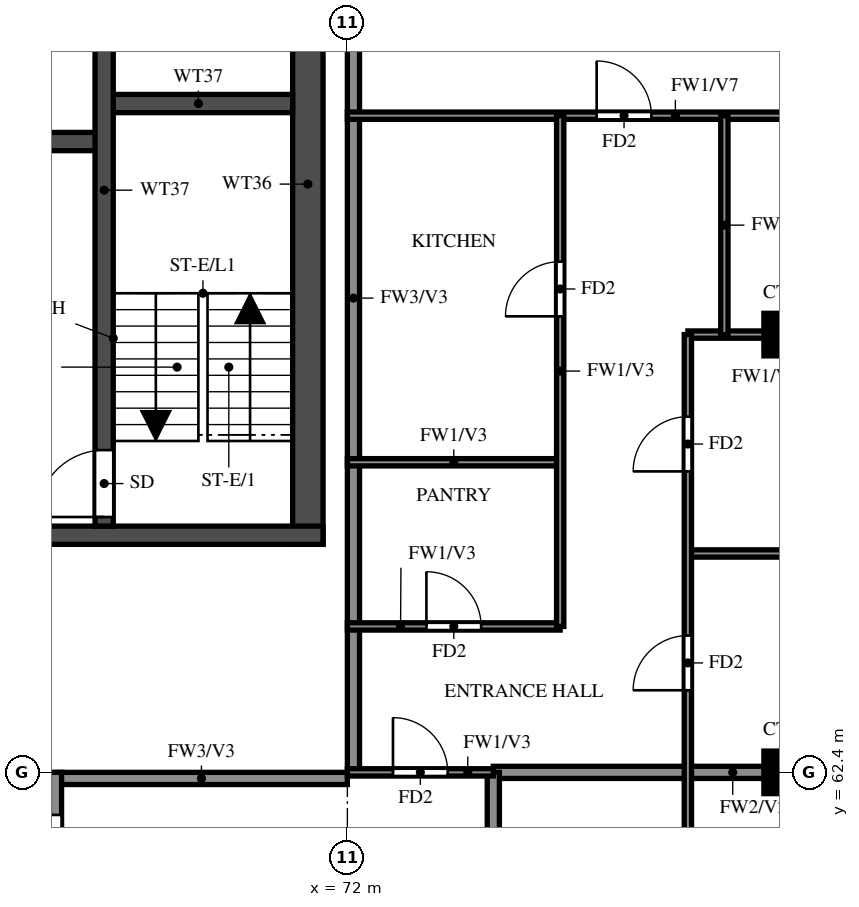
"""IFC4 building model, lengths in metres.
Left out: names, types, materials, properties, quantities, classifications, styles, units other than length and angle.
Written with IfcOpenShell. Run it as: python <this file> out.ifc"""

import sys

from ifc_helpers import new_model, si_unit, direction, frame, frame_2d, origin, origin_2d, place, context, subcontext, project, spatial, rectangle, extrude, source, transform, mapped, element, fill, save


model = new_model("IFC4")
c1 = context("Model", 3, precision=1e-05, world=origin(), true_north=direction((0.0, 1.0)))
c2 = subcontext(c1, "Body", "Model", "MODEL_VIEW")
j1 = project(units=[si_unit("LENGTHUNIT", "METRE"), si_unit("PLANEANGLEUNIT", "RADIAN")], contexts=[c1])
p1 = place(None, origin())
s1 = spatial("IfcSite", under=j1, at=p1, CompositionType="ELEMENT")
p2 = place(p1, origin())
s2 = spatial("IfcBuilding", under=s1, at=p2, CompositionType="ELEMENT")
p3 = place(p2, frame((0.0, 0.0, 260.5)))
s3 = spatial("IfcBuildingStorey", under=s2, at=p3, CompositionType="ELEMENT", Elevation=260.5)
m1 = source(origin(), c2, "Body", "SweptSolid", [
    extrude(rectangle(XDim=0.7, YDim=0.7, at=origin_2d()), origin(), (0.0, 0.0, 1.0), 3.22),
])
for number, where, z_axis, x_axis in (
    (1, (79.2, 62.4, 0.0), (0.0, 0.0, 1.0), (1.0, 0.0, 0.0)),
    (2, (79.2, 69.6, 0.0), (0.0, 0.0, 1.0), (1.0, 0.0, 0.0)),
):
    element("IfcColumn", number, at=place(p3, frame(where, z_axis=z_axis, x_axis=x_axis)), inside=s3, PredefinedType="COLUMN", context=c2, shape_type="MappedRepresentation", body=[
        mapped(m1, transform((0.0, 0.0, 0.0))),
    ])
p4 = place(p3, frame((71.35, 66.15, 0.0), z_axis=(0.0, 0.0, 1.0), x_axis=(0.0, 1.0, 0.0)))
e3 = element("IfcWall", 3, at=p4, inside=s3, PredefinedType="SHEAR", context=c2, shape_type="SweptSolid", body=[
    extrude(rectangle(XDim=11.85, YDim=0.5, at=frame_2d((5.925, 0.0))), origin(), (0.0, 0.0, 1.0), 3.22),
])
p5 = place(p3, frame((29.2, 66.3, 0.0), z_axis=(0.0, 0.0, 1.0), x_axis=(1.0, 0.0, 0.0)))
e4 = element("IfcWall", 4, at=p5, inside=s3, PredefinedType="SHEAR", context=c2, shape_type="SweptSolid", body=[
    extrude(rectangle(XDim=42.4, YDim=0.3, at=frame_2d((21.2, 0.0))), origin(), (0.0, 0.0, 1.0), 3.22),
])
p6 = place(p5, frame((1.425, 0.0, 0.0)))
e5 = element("IfcOpeningElement", 5, at=p6, cuts=e4, PredefinedType="OPENING", context=c2, shape_type="SweptSolid", body=[
    extrude(rectangle(XDim=1.1, YDim=2.1, at=frame_2d((0.55, 1.05))), frame((0.0, 0.16, 0.0), z_axis=(0.0, -1.0, 0.0), x_axis=(1.0, 0.0, 0.0)), (0.0, 0.0, 1.0), 0.32),
])
p7 = place(p5, frame((4.2, 0.0, 0.0)))
e6 = element("IfcOpeningElement", 6, at=p7, cuts=e4, PredefinedType="OPENING", context=c2, shape_type="SweptSolid", body=[
    extrude(rectangle(XDim=1.8, YDim=2.1, at=frame_2d((0.9, 1.05))), frame((0.0, 0.16, 0.0), z_axis=(0.0, -1.0, 0.0), x_axis=(1.0, 0.0, 0.0)), (0.0, 0.0, 1.0), 0.32),
])
p8 = place(p3, frame((32.8, 72.775, 0.0), z_axis=(0.0, 0.0, 1.0), x_axis=(1.0, 0.0, 0.0)))
e7 = element("IfcWall", 7, at=p8, inside=s3, PredefinedType="SHEAR", context=c2, shape_type="SweptSolid", body=[
    extrude(rectangle(XDim=35.2, YDim=0.3, at=frame_2d((17.6, 0.0))), origin(), (0.0, 0.0, 1.0), 3.22),
])
p9 = place(p8, frame((19.8, 0.0, 0.0)))
e8 = element("IfcOpeningElement", 8, at=p9, cuts=e7, PredefinedType="OPENING", context=c2, shape_type="SweptSolid", body=[
    extrude(rectangle(XDim=1.1, YDim=2.1, at=frame_2d((0.55, 1.05))), frame((0.0, 0.16, 0.0), z_axis=(0.0, -1.0, 0.0), x_axis=(1.0, 0.0, 0.0)), (0.0, 0.0, 1.0), 0.32),
])
p10 = place(p8, frame((27.725, 0.0, 0.0)))
e9 = element("IfcOpeningElement", 9, at=p10, cuts=e7, PredefinedType="OPENING", context=c2, shape_type="SweptSolid", body=[
    extrude(rectangle(XDim=1.1, YDim=2.1, at=frame_2d((0.55, 1.05))), frame((0.0, 0.16, 0.0), z_axis=(0.0, -1.0, 0.0), x_axis=(1.0, 0.0, 0.0)), (0.0, 0.0, 1.0), 0.32),
])
p11 = place(p8, frame((30.325, 0.0, 0.0)))
e10 = element("IfcOpeningElement", 10, at=p11, cuts=e7, PredefinedType="OPENING", context=c2, shape_type="SweptSolid", body=[
    extrude(rectangle(XDim=1.1, YDim=2.1, at=frame_2d((0.55, 1.05))), frame((0.0, 0.16, 0.0), z_axis=(0.0, -1.0, 0.0), x_axis=(1.0, 0.0, 0.0)), (0.0, 0.0, 1.0), 0.32),
])
p12 = place(p8, frame((3.825, 0.0, 0.0)))
e11 = element("IfcOpeningElement", 11, at=p12, cuts=e7, PredefinedType="OPENING", context=c2, shape_type="SweptSolid", body=[
    extrude(rectangle(XDim=1.1, YDim=2.1, at=frame_2d((0.55, 1.05))), frame((0.0, 0.16, 0.0), z_axis=(0.0, -1.0, 0.0), x_axis=(1.0, 0.0, 0.0)), (0.0, 0.0, 1.0), 0.32),
])
p13 = place(p8, frame((6.575, 0.0, 0.0)))
e12 = element("IfcOpeningElement", 12, at=p13, cuts=e7, PredefinedType="OPENING", context=c2, shape_type="SweptSolid", body=[
    extrude(rectangle(XDim=1.1, YDim=2.1, at=frame_2d((0.55, 1.05))), frame((0.0, 0.16, 0.0), z_axis=(0.0, -1.0, 0.0), x_axis=(1.0, 0.0, 0.0)), (0.0, 0.0, 1.0), 0.32),
])
p14 = place(p8, frame((9.325, 0.0, 0.0)))
e13 = element("IfcOpeningElement", 13, at=p14, cuts=e7, PredefinedType="OPENING", context=c2, shape_type="SweptSolid", body=[
    extrude(rectangle(XDim=1.1, YDim=2.1, at=frame_2d((0.55, 1.05))), frame((0.0, 0.16, 0.0), z_axis=(0.0, -1.0, 0.0), x_axis=(1.0, 0.0, 0.0)), (0.0, 0.0, 1.0), 0.32),
])
p15 = place(p8, frame((12.075, 0.0, 0.0)))
e14 = element("IfcOpeningElement", 14, at=p15, cuts=e7, PredefinedType="OPENING", context=c2, shape_type="SweptSolid", body=[
    extrude(rectangle(XDim=1.1, YDim=2.1, at=frame_2d((0.55, 1.05))), frame((0.0, 0.16, 0.0), z_axis=(0.0, -1.0, 0.0), x_axis=(1.0, 0.0, 0.0)), (0.0, 0.0, 1.0), 0.32),
])
p16 = place(p8, frame((14.825, 0.0, 0.0)))
e15 = element("IfcOpeningElement", 15, at=p16, cuts=e7, PredefinedType="OPENING", context=c2, shape_type="SweptSolid", body=[
    extrude(rectangle(XDim=1.1, YDim=2.1, at=frame_2d((0.55, 1.05))), frame((0.0, 0.16, 0.0), z_axis=(0.0, -1.0, 0.0), x_axis=(1.0, 0.0, 0.0)), (0.0, 0.0, 1.0), 0.32),
])
p17 = place(p8, frame((17.575, 0.0, 0.0)))
e16 = element("IfcOpeningElement", 16, at=p17, cuts=e7, PredefinedType="OPENING", context=c2, shape_type="SweptSolid", body=[
    extrude(rectangle(XDim=1.1, YDim=2.1, at=frame_2d((0.55, 1.05))), frame((0.0, 0.16, 0.0), z_axis=(0.0, -1.0, 0.0), x_axis=(1.0, 0.0, 0.0)), (0.0, 0.0, 1.0), 0.32),
])
p18 = place(p8, frame((0.95, 0.0, 0.0)))
e17 = element("IfcOpeningElement", 17, at=p18, cuts=e7, PredefinedType="OPENING", context=c2, shape_type="SweptSolid", body=[
    extrude(rectangle(XDim=1.1, YDim=2.1, at=frame_2d((0.55, 1.05))), frame((0.0, 0.16, 0.0), z_axis=(0.0, -1.0, 0.0), x_axis=(1.0, 0.0, 0.0)), (0.0, 0.0, 1.0), 0.32),
])
p19 = place(p3, frame((68.0, 73.4, 0.0), z_axis=(0.0, 0.0, 1.0), x_axis=(1.0, 0.0, 0.0)))
e18 = element("IfcWall", 18, at=p19, inside=s3, PredefinedType="SHEAR", context=c2, shape_type="SweptSolid", body=[
    extrude(rectangle(XDim=3.1, YDim=0.3, at=frame_2d((1.55, 0.0))), origin(), (0.0, 0.0, 1.0), 3.22),
])
p20 = place(p3, frame((68.0, 66.45, 0.0), z_axis=(0.0, 0.0, 1.0), x_axis=(0.0, 1.0, 0.0)))
e19 = element("IfcWall", 19, at=p20, inside=s3, PredefinedType="SHEAR", context=c2, shape_type="SweptSolid", body=[
    extrude(rectangle(XDim=11.05, YDim=0.3, at=frame_2d((5.525, 0.0))), origin(), (0.0, 0.0, 1.0), 3.22),
])
p21 = place(p20, frame((0.15, 0.0, 0.0)))
e20 = element("IfcOpeningElement", 20, at=p21, cuts=e19, PredefinedType="OPENING", context=c2, shape_type="SweptSolid", body=[
    extrude(rectangle(XDim=1.1, YDim=2.1, at=frame_2d((0.55, 1.05))), frame((0.0, 0.16, 0.0), z_axis=(0.0, -1.0, 0.0), x_axis=(1.0, 0.0, 0.0)), (0.0, 0.0, 1.0), 0.32),
])
p22 = place(p3, frame((67.2, 62.3, 0.0), z_axis=(0.0, 0.0, 1.0), x_axis=(1.0, 0.0, 0.0)))
e21 = element("IfcWall", 21, at=p22, inside=s3, PredefinedType="SOLIDWALL", context=c2, shape_type="SweptSolid", body=[
    extrude(rectangle(XDim=4.8, YDim=0.2, at=frame_2d((2.4, 0.0))), origin(), (0.0, 0.0, 1.0), 3.22),
])
p23 = place(p3, frame((67.2, 60.0, 0.0), z_axis=(0.0, 0.0, 1.0), x_axis=(0.0, 1.0, 0.0)))
e22 = element("IfcWall", 22, at=p23, inside=s3, PredefinedType="SOLIDWALL", context=c2, shape_type="SweptSolid", body=[
    extrude(rectangle(XDim=2.4, YDim=0.2, at=frame_2d((1.2, 0.0))), origin(), (0.0, 0.0, 1.0), 3.22),
])
p24 = place(p23, frame((0.7, 0.0, 0.0)))
e23 = element("IfcOpeningElement", 23, at=p24, cuts=e22, PredefinedType="OPENING", context=c2, shape_type="SweptSolid", body=[
    extrude(rectangle(XDim=1.0, YDim=2.1, at=frame_2d((0.5, 1.05))), frame((0.0, 0.11, 0.0), z_axis=(0.0, -1.0, 0.0), x_axis=(1.0, 0.0, 0.0)), (0.0, 0.0, 1.0), 0.22),
])
p25 = place(p3, frame((72.1, 62.4, 0.0), z_axis=(0.0, 0.0, 1.0), x_axis=(0.0, 1.0, 0.0)))
e24 = element("IfcWall", 24, at=p25, inside=s3, PredefinedType="SOLIDWALL", context=c2, shape_type="SweptSolid", body=[
    extrude(rectangle(XDim=15.6, YDim=0.2, at=frame_2d((7.8, 0.0))), origin(), (0.0, 0.0, 1.0), 3.22),
])
p26 = place(p3, frame((74.4, 62.4, 0.0), z_axis=(0.0, 0.0, 1.0), x_axis=(1.0, 0.0, 0.0)))
e25 = element("IfcWall", 25, at=p26, inside=s3, PredefinedType="SOLIDWALL", context=c2, shape_type="SweptSolid", body=[
    extrude(rectangle(XDim=7.875, YDim=0.2, at=frame_2d((3.938, 0.0))), origin(), (0.0, 0.0, 1.0), 3.22),
])
p27 = place(p3, frame((74.4, 60.0, 0.0), z_axis=(0.0, 0.0, 1.0), x_axis=(0.0, 1.0, 0.0)))
e26 = element("IfcWall", 26, at=p27, inside=s3, PredefinedType="SOLIDWALL", context=c2, shape_type="SweptSolid", body=[
    extrude(rectangle(XDim=2.4, YDim=0.2, at=frame_2d((1.2, 0.0))), origin(), (0.0, 0.0, 1.0), 3.22),
])
p28 = place(p3, frame((72.0, 62.4, 0.0), z_axis=(0.0, 0.0, 1.0), x_axis=(1.0, 0.0, 0.0)))
e27 = element("IfcWall", 27, at=p28, inside=s3, PredefinedType="PARTITIONING", context=c2, shape_type="SweptSolid", body=[
    extrude(rectangle(XDim=2.4, YDim=0.12, at=frame_2d((1.2, 0.0))), origin(), (0.0, 0.0, 1.0), 3.22),
])
p29 = place(p28, frame((0.75, 0.0, 0.0)))
e28 = element("IfcOpeningElement", 28, at=p29, cuts=e27, PredefinedType="OPENING", context=c2, shape_type="SweptSolid", body=[
    extrude(rectangle(XDim=0.9, YDim=2.1, at=frame_2d((0.45, 1.05))), frame((0.0, 0.07, 0.0), z_axis=(0.0, -1.0, 0.0), x_axis=(1.0, 0.0, 0.0)), (0.0, 0.0, 1.0), 0.14),
])
p30 = place(p3, frame((72.0, 64.8, 0.0), z_axis=(0.0, 0.0, 1.0), x_axis=(1.0, 0.0, 0.0)))
e29 = element("IfcWall", 29, at=p30, inside=s3, PredefinedType="PARTITIONING", context=c2, shape_type="SweptSolid", body=[
    extrude(rectangle(XDim=3.5, YDim=0.12, at=frame_2d((1.75, 0.0))), origin(), (0.0, 0.0, 1.0), 3.22),
])
p31 = place(p30, frame((1.3, 0.0, 0.0)))
e30 = element("IfcOpeningElement", 30, at=p31, cuts=e29, PredefinedType="OPENING", context=c2, shape_type="SweptSolid", body=[
    extrude(rectangle(XDim=0.9, YDim=2.1, at=frame_2d((0.45, 1.05))), frame((0.0, 0.07, 0.0), z_axis=(0.0, -1.0, 0.0), x_axis=(1.0, 0.0, 0.0)), (0.0, 0.0, 1.0), 0.14),
])
p32 = place(p3, frame((77.6, 66.0, 0.0), z_axis=(0.0, 0.0, 1.0), x_axis=(1.0, 0.0, 0.0)))
e31 = element("IfcWall", 31, at=p32, inside=s3, PredefinedType="PARTITIONING", context=c2, shape_type="SweptSolid", body=[
    extrude(rectangle(XDim=4.675, YDim=0.12, at=frame_2d((2.337, 0.0))), origin(), (0.0, 0.0, 1.0), 2.32),
])
p33 = place(p3, frame((72.0, 67.5, 0.0), z_axis=(0.0, 0.0, 1.0), x_axis=(1.0, 0.0, 0.0)))
e32 = element("IfcWall", 32, at=p33, inside=s3, PredefinedType="PARTITIONING", context=c2, shape_type="SweptSolid", body=[
    extrude(rectangle(XDim=3.5, YDim=0.12, at=frame_2d((1.75, 0.0))), origin(), (0.0, 0.0, 1.0), 3.22),
])
p34 = place(p3, frame((77.6, 69.6, 0.0), z_axis=(0.0, 0.0, 1.0), x_axis=(1.0, 0.0, 0.0)))
e33 = element("IfcWall", 33, at=p34, inside=s3, PredefinedType="PARTITIONING", context=c2, shape_type="SweptSolid", body=[
    extrude(rectangle(XDim=4.675, YDim=0.12, at=frame_2d((2.337, 0.0))), origin(), (0.0, 0.0, 1.0), 3.22),
])
p35 = place(p34, frame((2.337, 0.0, 0.0)))
e34 = element("IfcOpeningElement", 34, at=p35, cuts=e33, PredefinedType="OPENING", context=c2, shape_type="SweptSolid", body=[
    extrude(rectangle(XDim=0.8, YDim=2.1, at=frame_2d((0.4, 1.05))), frame((0.0, 0.07, 0.0), z_axis=(0.0, -1.0, 0.0), x_axis=(1.0, 0.0, 0.0)), (0.0, 0.0, 1.0), 0.14),
])
p36 = place(p3, frame((72.0, 73.2, 0.0), z_axis=(0.0, 0.0, 1.0), x_axis=(1.0, 0.0, 0.0)))
e35 = element("IfcWall", 35, at=p36, inside=s3, PredefinedType="PARTITIONING", context=c2, shape_type="SweptSolid", body=[
    extrude(rectangle(XDim=10.275, YDim=0.12, at=frame_2d((5.137, 0.0))), origin(), (0.0, 0.0, 1.0), 2.32),
])
p37 = place(p36, frame((4.1, 0.0, 0.0)))
e36 = element("IfcOpeningElement", 36, at=p37, cuts=e35, PredefinedType="OPENING", context=c2, shape_type="SweptSolid", body=[
    extrude(rectangle(XDim=0.9, YDim=2.1, at=frame_2d((0.45, 1.05))), frame((0.0, 0.07, 0.0), z_axis=(0.0, -1.0, 0.0), x_axis=(1.0, 0.0, 0.0)), (0.0, 0.0, 1.0), 0.14),
])
p38 = place(p3, frame((75.5, 64.8, 0.0), z_axis=(0.0, 0.0, 1.0), x_axis=(0.0, 1.0, 0.0)))
e37 = element("IfcWall", 37, at=p38, inside=s3, PredefinedType="PARTITIONING", context=c2, shape_type="SweptSolid", body=[
    extrude(rectangle(XDim=8.4, YDim=0.12, at=frame_2d((4.2, 0.0))), origin(), (0.0, 0.0, 1.0), 3.22),
])
p39 = place(p38, frame((5.1, 0.0, 0.0)))
e38 = element("IfcOpeningElement", 38, at=p39, cuts=e37, PredefinedType="OPENING", context=c2, shape_type="SweptSolid", body=[
    extrude(rectangle(XDim=0.9, YDim=2.1, at=frame_2d((0.45, 1.05))), frame((0.0, 0.07, 0.0), z_axis=(0.0, -1.0, 0.0), x_axis=(1.0, 0.0, 0.0)), (0.0, 0.0, 1.0), 0.14),
])
p40 = place(p3, frame((77.6, 48.125, 0.0), z_axis=(0.0, 0.0, 1.0), x_axis=(0.0, 1.0, 0.0)))
e39 = element("IfcWall", 39, at=p40, inside=s3, PredefinedType="PARTITIONING", context=c2, shape_type="SweptSolid", body=[
    extrude(rectangle(XDim=21.475, YDim=0.12, at=frame_2d((10.738, 0.0))), origin(), (0.0, 0.0, 1.0), 3.22),
])
p41 = place(p40, frame((1.288, 0.0, 0.0)))
e40 = element("IfcOpeningElement", 40, at=p41, cuts=e39, PredefinedType="OPENING", context=c2, shape_type="SweptSolid", body=[
    extrude(rectangle(XDim=0.9, YDim=2.1, at=frame_2d((0.45, 1.05))), frame((0.0, 0.07, 0.0), z_axis=(0.0, -1.0, 0.0), x_axis=(1.0, 0.0, 0.0)), (0.0, 0.0, 1.0), 0.14),
])
p42 = place(p40, frame((4.825, 0.0, 0.0)))
e41 = element("IfcOpeningElement", 41, at=p42, cuts=e39, PredefinedType="OPENING", context=c2, shape_type="SweptSolid", body=[
    extrude(rectangle(XDim=0.9, YDim=2.1, at=frame_2d((0.45, 1.05))), frame((0.0, 0.07, 0.0), z_axis=(0.0, -1.0, 0.0), x_axis=(1.0, 0.0, 0.0)), (0.0, 0.0, 1.0), 0.14),
])
p43 = place(p40, frame((9.925, 0.0, 0.0)))
e42 = element("IfcOpeningElement", 42, at=p43, cuts=e39, PredefinedType="OPENING", context=c2, shape_type="SweptSolid", body=[
    extrude(rectangle(XDim=1.5, YDim=2.1, at=frame_2d((0.75, 1.05))), frame((0.0, 0.07, 0.0), z_axis=(0.0, -1.0, 0.0), x_axis=(1.0, 0.0, 0.0)), (0.0, 0.0, 1.0), 0.14),
])
p44 = place(p40, frame((15.625, 0.0, 0.0)))
e43 = element("IfcOpeningElement", 43, at=p44, cuts=e39, PredefinedType="OPENING", context=c2, shape_type="SweptSolid", body=[
    extrude(rectangle(XDim=0.9, YDim=2.1, at=frame_2d((0.45, 1.05))), frame((0.0, 0.07, 0.0), z_axis=(0.0, -1.0, 0.0), x_axis=(1.0, 0.0, 0.0)), (0.0, 0.0, 1.0), 0.14),
])
p45 = place(p40, frame((19.225, 0.0, 0.0)))
e44 = element("IfcOpeningElement", 44, at=p45, cuts=e39, PredefinedType="OPENING", context=c2, shape_type="SweptSolid", body=[
    extrude(rectangle(XDim=0.9, YDim=2.1, at=frame_2d((0.45, 1.05))), frame((0.0, 0.07, 0.0), z_axis=(0.0, -1.0, 0.0), x_axis=(1.0, 0.0, 0.0)), (0.0, 0.0, 1.0), 0.14),
])
p46 = place(p3, frame((78.2, 69.6, 0.0), z_axis=(0.0, 0.0, 1.0), x_axis=(0.0, 1.0, 0.0)))
e45 = element("IfcWall", 45, at=p46, inside=s3, PredefinedType="PARTITIONING", context=c2, shape_type="SweptSolid", body=[
    extrude(rectangle(XDim=3.6, YDim=0.12, at=frame_2d((1.8, 0.0))), origin(), (0.0, 0.0, 1.0), 3.22),
])
p47 = place(p21, origin())
e46 = element("IfcDoor", 46, at=p47, inside=s3, OperationType="SINGLE_SWING_RIGHT", PredefinedType="DOOR", context=c2, shape_type="SweptSolid", body=[
    extrude(rectangle(XDim=1.1, YDim=2.1, at=frame_2d((0.55, 1.05))), frame((0.0, 0.025, 0.0), z_axis=(0.0, -1.0, 0.0), x_axis=(1.0, 0.0, 0.0)), (0.0, 0.0, 1.0), 0.05),
])
fill(e20, e46)
p48 = place(p29, origin())
e47 = element("IfcDoor", 47, at=p48, inside=s3, OperationType="SINGLE_SWING_LEFT", PredefinedType="DOOR", context=c2, shape_type="SweptSolid", body=[
    extrude(rectangle(XDim=0.9, YDim=2.1, at=frame_2d((0.45, 1.05))), frame((0.0, 0.025, 0.0), z_axis=(0.0, -1.0, 0.0), x_axis=(1.0, 0.0, 0.0)), (0.0, 0.0, 1.0), 0.05),
])
fill(e28, e47)
p49 = place(p24, origin())
e48 = element("IfcDoor", 48, at=p49, inside=s3, OperationType="SINGLE_SWING_RIGHT", PredefinedType="DOOR", context=c2, shape_type="SweptSolid", body=[
    extrude(rectangle(XDim=1.0, YDim=2.1, at=frame_2d((0.5, 1.05))), frame((0.0, 0.025, 0.0), z_axis=(0.0, -1.0, 0.0), x_axis=(1.0, 0.0, 0.0)), (0.0, 0.0, 1.0), 0.05),
])
fill(e23, e48)
p50 = place(p44, origin())
e49 = element("IfcDoor", 49, at=p50, inside=s3, OperationType="SINGLE_SWING_LEFT", PredefinedType="DOOR", context=c2, shape_type="SweptSolid", body=[
    extrude(rectangle(XDim=0.9, YDim=2.1, at=frame_2d((0.45, 1.05))), frame((0.0, 0.025, 0.0), z_axis=(0.0, -1.0, 0.0), x_axis=(1.0, 0.0, 0.0)), (0.0, 0.0, 1.0), 0.05),
])
fill(e43, e49)
p51 = place(p45, origin())
e50 = element("IfcDoor", 50, at=p51, inside=s3, OperationType="SINGLE_SWING_LEFT", PredefinedType="DOOR", context=c2, shape_type="SweptSolid", body=[
    extrude(rectangle(XDim=0.9, YDim=2.1, at=frame_2d((0.45, 1.05))), frame((0.0, 0.025, 0.0), z_axis=(0.0, -1.0, 0.0), x_axis=(1.0, 0.0, 0.0)), (0.0, 0.0, 1.0), 0.05),
])
fill(e44, e50)
p52 = place(p37, origin())
e51 = element("IfcDoor", 51, at=p52, inside=s3, OperationType="SINGLE_SWING_LEFT", PredefinedType="DOOR", context=c2, shape_type="SweptSolid", body=[
    extrude(rectangle(XDim=0.9, YDim=2.1, at=frame_2d((0.45, 1.05))), frame((0.0, 0.025, 0.0), z_axis=(0.0, -1.0, 0.0), x_axis=(1.0, 0.0, 0.0)), (0.0, 0.0, 1.0), 0.05),
])
fill(e36, e51)
p53 = place(p31, origin())
e52 = element("IfcDoor", 52, at=p53, inside=s3, OperationType="SINGLE_SWING_LEFT", PredefinedType="DOOR", context=c2, shape_type="SweptSolid", body=[
    extrude(rectangle(XDim=0.9, YDim=2.1, at=frame_2d((0.45, 1.05))), frame((0.0, 0.025, 0.0), z_axis=(0.0, -1.0, 0.0), x_axis=(1.0, 0.0, 0.0)), (0.0, 0.0, 1.0), 0.05),
])
fill(e30, e52)
p54 = place(p39, origin())
e53 = element("IfcDoor", 53, at=p54, inside=s3, OperationType="SINGLE_SWING_RIGHT", PredefinedType="DOOR", context=c2, shape_type="SweptSolid", body=[
    extrude(rectangle(XDim=0.9, YDim=2.1, at=frame_2d((0.45, 1.05))), frame((0.0, 0.025, 0.0), z_axis=(0.0, -1.0, 0.0), x_axis=(1.0, 0.0, 0.0)), (0.0, 0.0, 1.0), 0.05),
])
fill(e38, e53)
save(model, sys.argv[1])
